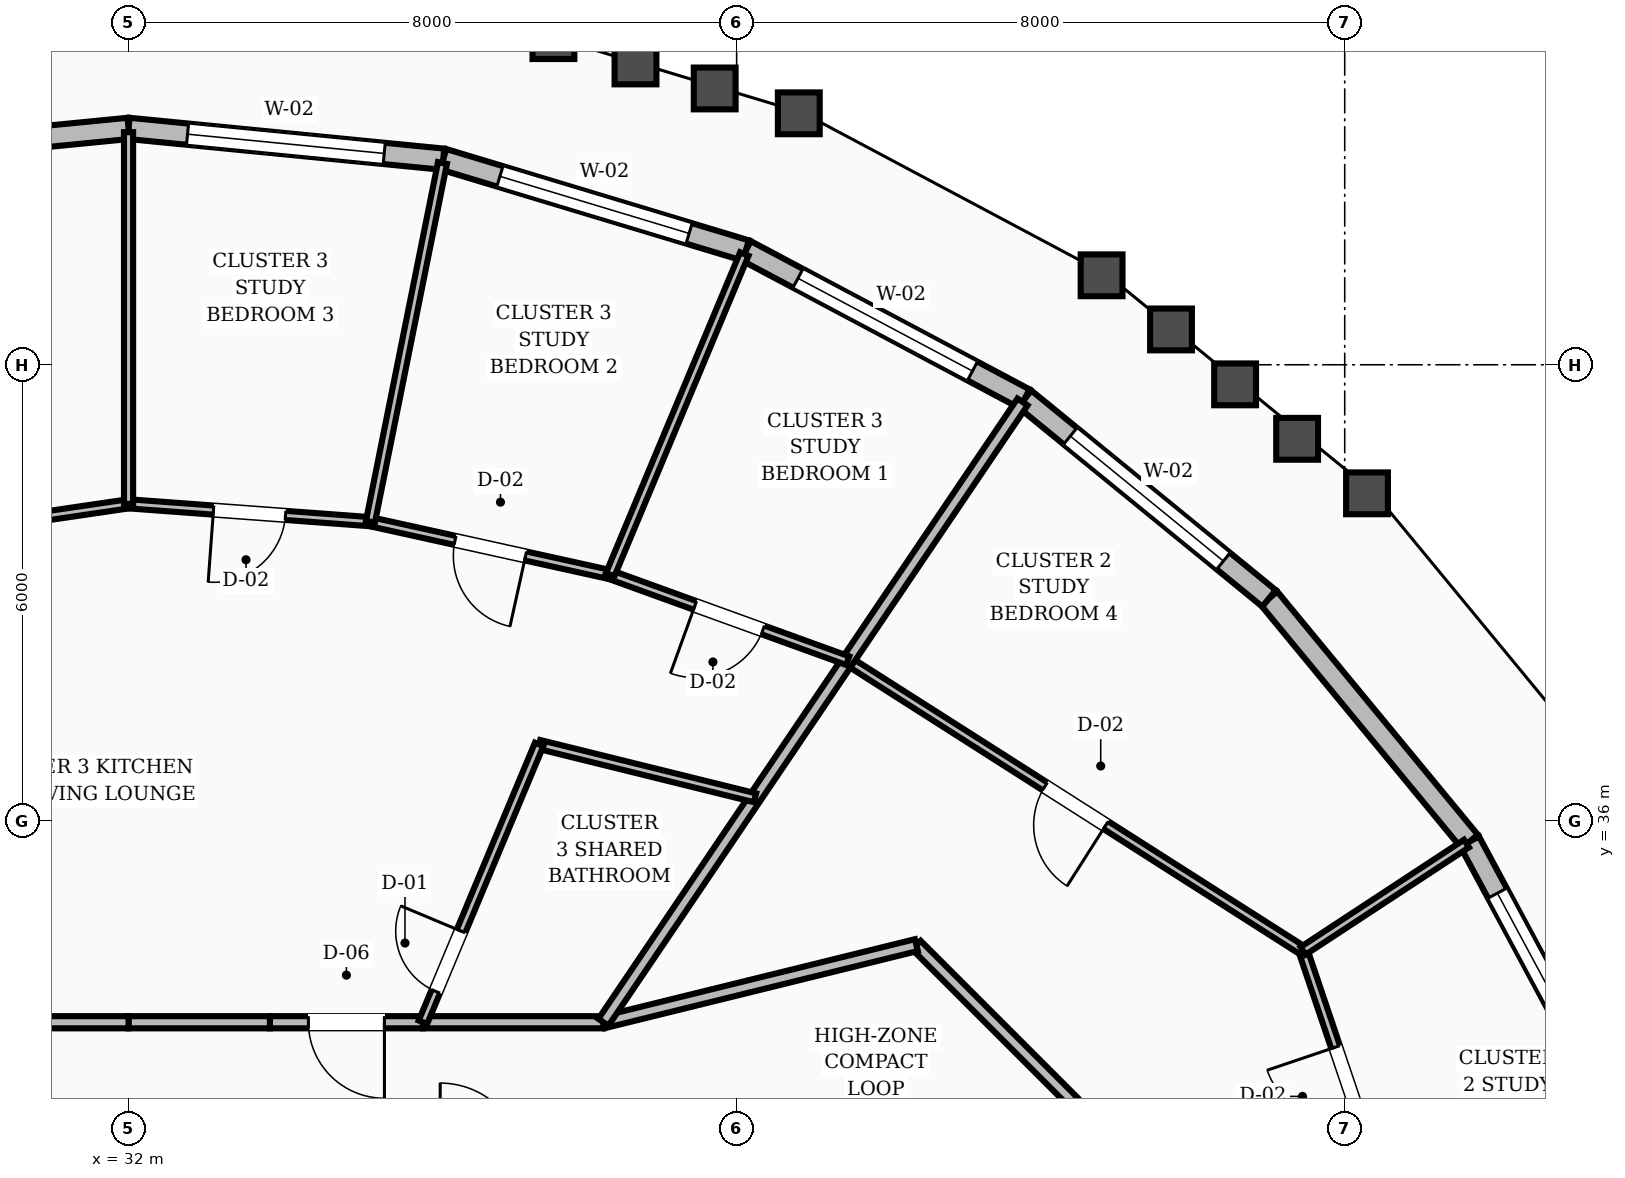
"""IFC4 building model, lengths in metres.
Left out: names, types, materials, properties, quantities, classifications, styles, units other than length and angle.
Written with IfcOpenShell. Run it as: python <this file> out.ifc"""

import sys

from ifc_helpers import new_model, si_unit, direction, frame, frame_2d, origin, place, context, subcontext, project, spatial, rectangle, extrude, element, fill, save


model = new_model("IFC4")
c1 = context("Model", 3, precision=1e-05, world=origin(), true_north=direction((0.0, 1.0)))
c2 = subcontext(c1, "Body", "Model", "MODEL_VIEW")
j1 = project(units=[si_unit("LENGTHUNIT", "METRE"), si_unit("PLANEANGLEUNIT", "RADIAN")], contexts=[c1])
p1 = place(None, origin())
s1 = spatial("IfcSite", under=j1, at=p1, CompositionType="ELEMENT")
p2 = place(p1, origin())
s2 = spatial("IfcBuilding", under=s1, at=p2, CompositionType="ELEMENT")
p3 = place(p2, frame((0.0, 0.0, 247.2)))
s3 = spatial("IfcBuildingStorey", under=s2, at=p3, CompositionType="ELEMENT", Elevation=247.2)
p4 = place(p3, frame((51.604, 32.078, 0.0), z_axis=(0.0, 0.0, 1.0), x_axis=(-0.473326520675, 0.880887055658, 0.0)))
e1 = element("IfcWall", 1, at=p4, inside=s3, PredefinedType="STANDARD", context=c2, shape_type="SweptSolid", body=[
    extrude(rectangle(XDim=4.143, YDim=0.28, at=frame_2d((2.071, 0.0))), origin(), (0.0, 0.0, 1.0), 2.88),
])
p5 = place(p4, frame((0.771, 0.0, 0.8)))
e2 = element("IfcOpeningElement", 2, at=p5, cuts=e1, PredefinedType="OPENING", context=c2, shape_type="SweptSolid", body=[
    extrude(rectangle(XDim=2.6, YDim=1.65, at=frame_2d((1.3, 0.825))), frame((0.0, 0.15, 0.0), z_axis=(0.0, -1.0, 0.0), x_axis=(1.0, 0.0, 0.0)), (0.0, 0.0, 1.0), 0.3),
])
p6 = place(p3, frame((49.644, 35.728, 0.0), z_axis=(0.0, 0.0, 1.0), x_axis=(-0.63634880002, 0.771401454959, 0.0)))
e3 = element("IfcWall", 3, at=p6, inside=s3, PredefinedType="STANDARD", context=c2, shape_type="SweptSolid", body=[
    extrude(rectangle(XDim=4.147, YDim=0.28, at=frame_2d((2.073, 0.0))), origin(), (0.0, 0.0, 1.0), 2.88),
])
p7 = place(p3, frame((47.005, 38.927, 0.0), z_axis=(0.0, 0.0, 1.0), x_axis=(-0.774627683951, 0.632417545025, 0.0)))
e4 = element("IfcWall", 4, at=p7, inside=s3, PredefinedType="STANDARD", context=c2, shape_type="SweptSolid", body=[
    extrude(rectangle(XDim=4.151, YDim=0.28, at=frame_2d((2.076, 0.0))), origin(), (0.0, 0.0, 1.0), 2.88),
])
p8 = place(p7, frame((0.776, 0.0, 0.8)))
e5 = element("IfcOpeningElement", 5, at=p8, cuts=e4, PredefinedType="OPENING", context=c2, shape_type="SweptSolid", body=[
    extrude(rectangle(XDim=2.6, YDim=1.65, at=frame_2d((1.3, 0.825))), frame((0.0, 0.15, 0.0), z_axis=(0.0, -1.0, 0.0), x_axis=(1.0, 0.0, 0.0)), (0.0, 0.0, 1.0), 0.3),
])
p9 = place(p3, frame((43.789, 41.552, 0.0), z_axis=(0.0, 0.0, 1.0), x_axis=(-0.88293458377, 0.469496028506, 0.0)))
e6 = element("IfcWall", 6, at=p9, inside=s3, PredefinedType="STANDARD", context=c2, shape_type="SweptSolid", body=[
    extrude(rectangle(XDim=4.155, YDim=0.28, at=frame_2d((2.077, 0.0))), origin(), (0.0, 0.0, 1.0), 2.88),
])
p10 = place(p9, frame((0.778, 0.0, 0.8)))
e7 = element("IfcOpeningElement", 7, at=p10, cuts=e6, PredefinedType="OPENING", context=c2, shape_type="SweptSolid", body=[
    extrude(rectangle(XDim=2.6, YDim=1.65, at=frame_2d((1.3, 0.825))), frame((0.0, 0.15, 0.0), z_axis=(0.0, -1.0, 0.0), x_axis=(1.0, 0.0, 0.0)), (0.0, 0.0, 1.0), 0.3),
])
p11 = place(p3, frame((40.121, 43.503, 0.0), z_axis=(0.0, 0.0, 1.0), x_axis=(-0.957348244256, 0.288936566083, 0.0)))
e8 = element("IfcWall", 8, at=p11, inside=s3, PredefinedType="STANDARD", context=c2, shape_type="SweptSolid", body=[
    extrude(rectangle(XDim=4.158, YDim=0.28, at=frame_2d((2.079, 0.0))), origin(), (0.0, 0.0, 1.0), 2.88),
])
p12 = place(p11, frame((0.779, 0.0, 0.8)))
e9 = element("IfcOpeningElement", 9, at=p12, cuts=e8, PredefinedType="OPENING", context=c2, shape_type="SweptSolid", body=[
    extrude(rectangle(XDim=2.6, YDim=1.65, at=frame_2d((1.3, 0.825))), frame((0.0, 0.15, 0.0), z_axis=(0.0, -1.0, 0.0), x_axis=(1.0, 0.0, 0.0)), (0.0, 0.0, 1.0), 0.3),
])
p13 = place(p3, frame((36.14, 44.704, 0.0), z_axis=(0.0, 0.0, 1.0), x_axis=(-0.995236791144, 0.09748707378, 0.0)))
e10 = element("IfcWall", 10, at=p13, inside=s3, PredefinedType="STANDARD", context=c2, shape_type="SweptSolid", body=[
    extrude(rectangle(XDim=4.16, YDim=0.28, at=frame_2d((2.08, 0.0))), origin(), (0.0, 0.0, 1.0), 2.88),
])
p14 = place(p13, frame((0.78, 0.0, 0.8)))
e11 = element("IfcOpeningElement", 11, at=p14, cuts=e10, PredefinedType="OPENING", context=c2, shape_type="SweptSolid", body=[
    extrude(rectangle(XDim=2.6, YDim=1.65, at=frame_2d((1.3, 0.825))), frame((0.0, 0.15, 0.0), z_axis=(0.0, -1.0, 0.0), x_axis=(1.0, 0.0, 0.0)), (0.0, 0.0, 1.0), 0.3),
])
p15 = place(p3, frame((32.0, 45.11, 0.0), z_axis=(0.0, 0.0, 1.0), x_axis=(-0.995236791144, -0.09748707378, 0.0)))
e12 = element("IfcWall", 12, at=p15, inside=s3, PredefinedType="STANDARD", context=c2, shape_type="SweptSolid", body=[
    extrude(rectangle(XDim=4.16, YDim=0.28, at=frame_2d((2.08, 0.0))), origin(), (0.0, 0.0, 1.0), 2.88),
])
p16 = place(p3, frame((44.427, 32.303, 0.0), z_axis=(0.0, 0.0, 1.0), x_axis=(-0.707106781187, 0.707106781187, 0.0)))
e13 = element("IfcWall", 13, at=p16, inside=s3, PredefinedType="SOLIDWALL", context=c2, shape_type="SweptSolid", body=[
    extrude(rectangle(XDim=2.916, YDim=0.16, at=frame_2d((1.458, 0.0))), origin(), (0.0, 0.0, 1.0), 2.87),
])
p17 = place(p3, frame((42.365, 34.365, 0.0), z_axis=(0.0, 0.0, 1.0), x_axis=(-0.970939799552, -0.239323850978, 0.0)))
e14 = element("IfcWall", 14, at=p17, inside=s3, PredefinedType="SOLIDWALL", context=c2, shape_type="SweptSolid", body=[
    extrude(rectangle(XDim=4.241, YDim=0.16, at=frame_2d((2.12, 0.0))), origin(), (0.0, 0.0, 1.0), 2.87),
])
p18 = place(p3, frame((38.248, 33.35, 0.0), z_axis=(0.0, 0.0, 1.0), x_axis=(-1.0, 0.0, 0.0)))
e15 = element("IfcWall", 15, at=p18, inside=s3, PredefinedType="SOLIDWALL", context=c2, shape_type="SweptSolid", body=[
    extrude(rectangle(XDim=2.375, YDim=0.16, at=frame_2d((1.188, 0.0))), origin(), (0.0, 0.0, 1.0), 2.87),
])
p19 = place(p3, frame((35.873, 33.35, 0.0), z_axis=(0.0, 0.0, 1.0), x_axis=(-1.0, 0.0, 0.0)))
e16 = element("IfcWall", 16, at=p19, inside=s3, PredefinedType="SOLIDWALL", context=c2, shape_type="SweptSolid", body=[
    extrude(rectangle(XDim=2.013, YDim=0.16, at=frame_2d((1.006, 0.0))), origin(), (0.0, 0.0, 1.0), 2.87),
])
p20 = place(p19, frame((0.507, 0.0, 0.0)))
e17 = element("IfcOpeningElement", 17, at=p20, cuts=e16, PredefinedType="OPENING", context=c2, shape_type="SweptSolid", body=[
    extrude(rectangle(XDim=1.0, YDim=2.1, at=frame_2d((0.5, 1.05))), frame((0.0, 0.09, 0.0), z_axis=(0.0, -1.0, 0.0), x_axis=(1.0, 0.0, 0.0)), (0.0, 0.0, 1.0), 0.18),
])
for number, where, z_axis, x_axis in (
    (18, (33.86, 33.35, 0.0), (0.0, 0.0, 1.0), (-1.0, 0.0, 0.0)),
    (19, (32.0, 33.35, 0.0), (0.0, 0.0, 1.0), (-1.0, 0.0, 0.0)),
):
    element("IfcWall", number, at=place(p3, frame(where, z_axis=z_axis, x_axis=x_axis)), inside=s3, PredefinedType="SOLIDWALL", context=c2, shape_type="SweptSolid", body=[
        extrude(rectangle(XDim=1.86, YDim=0.16, at=frame_2d((0.93, 0.0))), origin(), (0.0, 0.0, 1.0), 2.87),
    ])
p21 = place(p3, frame((48.612, 30.857, 0.0), z_axis=(0.0, 0.0, 1.0), x_axis=(-0.320106009533, 0.947381730171, 0.0)))
e20 = element("IfcWall", 20, at=p21, inside=s3, PredefinedType="PARTITIONING", context=c2, shape_type="SweptSolid", body=[
    extrude(rectangle(XDim=3.624, YDim=0.12, at=frame_2d((1.812, 0.0))), origin(), (0.0, 0.0, 1.0), 2.87),
])
p22 = place(p21, frame((1.337, 0.0, 0.0)))
e21 = element("IfcOpeningElement", 21, at=p22, cuts=e20, PredefinedType="OPENING", context=c2, shape_type="SweptSolid", body=[
    extrude(rectangle(XDim=0.95, YDim=2.1, at=frame_2d((0.475, 1.05))), frame((0.0, 0.07, 0.0), z_axis=(0.0, -1.0, 0.0), x_axis=(1.0, 0.0, 0.0)), (0.0, 0.0, 1.0), 0.14),
])
p23 = place(p3, frame((47.452, 34.29, 0.0), z_axis=(0.0, 0.0, 1.0), x_axis=(-0.84332026634, 0.53741132141, 0.0)))
e22 = element("IfcWall", 22, at=p23, inside=s3, PredefinedType="PARTITIONING", context=c2, shape_type="SweptSolid", body=[
    extrude(rectangle(XDim=7.104, YDim=0.12, at=frame_2d((3.552, 0.0))), origin(), (0.0, 0.0, 1.0), 2.87),
])
p24 = place(p23, frame((3.077, 0.0, 0.0)))
e23 = element("IfcOpeningElement", 23, at=p24, cuts=e22, PredefinedType="OPENING", context=c2, shape_type="SweptSolid", body=[
    extrude(rectangle(XDim=0.95, YDim=2.1, at=frame_2d((0.475, 1.05))), frame((0.0, 0.07, 0.0), z_axis=(0.0, -1.0, 0.0), x_axis=(1.0, 0.0, 0.0)), (0.0, 0.0, 1.0), 0.14),
])
p25 = place(p3, frame((47.452, 34.29, 0.0), z_axis=(0.0, 0.0, 1.0), x_axis=(0.835988015849, 0.548747699181, 0.0)))
e24 = element("IfcWall", 24, at=p25, inside=s3, PredefinedType="PARTITIONING", context=c2, shape_type="SweptSolid", body=[
    extrude(rectangle(XDim=2.571, YDim=0.12, at=frame_2d((1.286, 0.0))), origin(), (0.0, 0.0, 1.0), 2.87),
])
p26 = place(p3, frame((38.248, 33.35, 0.0), z_axis=(0.0, 0.0, 1.0), x_axis=(0.559821071882, 0.828613521177, 0.0)))
e25 = element("IfcWall", 25, at=p26, inside=s3, PredefinedType="SOLIDWALL", context=c2, shape_type="SweptSolid", body=[
    extrude(rectangle(XDim=9.849, YDim=0.16, at=frame_2d((4.924, 0.0))), origin(), (0.0, 0.0, 1.0), 2.87),
])
p27 = place(p3, frame((40.242, 36.303, 0.0), z_axis=(0.0, 0.0, 1.0), x_axis=(-0.970777237008, 0.239982407911, 0.0)))
e26 = element("IfcWall", 26, at=p27, inside=s3, PredefinedType="PARTITIONING", context=c2, shape_type="SweptSolid", body=[
    extrude(rectangle(XDim=2.926, YDim=0.12, at=frame_2d((1.463, 0.0))), origin(), (0.0, 0.0, 1.0), 2.87),
])
p28 = place(p3, frame((35.873, 33.35, 0.0), z_axis=(0.0, 0.0, 1.0), x_axis=(0.386006387389, 0.922496107794, 0.0)))
e27 = element("IfcWall", 27, at=p28, inside=s3, PredefinedType="PARTITIONING", context=c2, shape_type="SweptSolid", body=[
    extrude(rectangle(XDim=3.962, YDim=0.12, at=frame_2d((1.981, 0.0))), origin(), (0.0, 0.0, 1.0), 2.87),
])
p29 = place(p28, frame((0.44, 0.0, 0.0)))
e28 = element("IfcOpeningElement", 28, at=p29, cuts=e27, PredefinedType="OPENING", context=c2, shape_type="SweptSolid", body=[
    extrude(rectangle(XDim=0.86, YDim=2.1, at=frame_2d((0.43, 1.05))), frame((0.0, 0.07, 0.0), z_axis=(0.0, -1.0, 0.0), x_axis=(1.0, 0.0, 0.0)), (0.0, 0.0, 1.0), 0.14),
])
p30 = place(p3, frame((41.462, 38.107, 0.0), z_axis=(0.0, 0.0, 1.0), x_axis=(-0.940285712811, 0.340386219293, 0.0)))
e29 = element("IfcWall", 29, at=p30, inside=s3, PredefinedType="PARTITIONING", context=c2, shape_type="SweptSolid", body=[
    extrude(rectangle(XDim=3.324, YDim=0.12, at=frame_2d((1.662, 0.0))), origin(), (0.0, 0.0, 1.0), 2.87),
])
p31 = place(p30, frame((1.187, 0.0, 0.0)))
e30 = element("IfcOpeningElement", 30, at=p31, cuts=e29, PredefinedType="OPENING", context=c2, shape_type="SweptSolid", body=[
    extrude(rectangle(XDim=0.95, YDim=2.1, at=frame_2d((0.475, 1.05))), frame((0.0, 0.07, 0.0), z_axis=(0.0, -1.0, 0.0), x_axis=(1.0, 0.0, 0.0)), (0.0, 0.0, 1.0), 0.14),
])
p32 = place(p3, frame((38.336, 39.239, 0.0), z_axis=(0.0, 0.0, 1.0), x_axis=(-0.976460139278, 0.215697928599, 0.0)))
e31 = element("IfcWall", 31, at=p32, inside=s3, PredefinedType="PARTITIONING", context=c2, shape_type="SweptSolid", body=[
    extrude(rectangle(XDim=3.23, YDim=0.12, at=frame_2d((1.615, 0.0))), origin(), (0.0, 0.0, 1.0), 2.87),
])
p33 = place(p32, frame((1.14, 0.0, 0.0)))
e32 = element("IfcOpeningElement", 32, at=p33, cuts=e31, PredefinedType="OPENING", context=c2, shape_type="SweptSolid", body=[
    extrude(rectangle(XDim=0.95, YDim=2.1, at=frame_2d((0.475, 1.05))), frame((0.0, 0.07, 0.0), z_axis=(0.0, -1.0, 0.0), x_axis=(1.0, 0.0, 0.0)), (0.0, 0.0, 1.0), 0.14),
])
p34 = place(p3, frame((38.336, 39.239, 0.0), z_axis=(0.0, 0.0, 1.0), x_axis=(0.385972204877, 0.922510410273, 0.0)))
e33 = element("IfcWall", 33, at=p34, inside=s3, PredefinedType="PARTITIONING", context=c2, shape_type="SweptSolid", body=[
    extrude(rectangle(XDim=4.573, YDim=0.12, at=frame_2d((2.286, 0.0))), origin(), (0.0, 0.0, 1.0), 2.87),
])
p35 = place(p3, frame((35.182, 39.935, 0.0), z_axis=(0.0, 0.0, 1.0), x_axis=(-0.997276098801, 0.073758950379, 0.0)))
e34 = element("IfcWall", 34, at=p35, inside=s3, PredefinedType="PARTITIONING", context=c2, shape_type="SweptSolid", body=[
    extrude(rectangle(XDim=3.191, YDim=0.12, at=frame_2d((1.595, 0.0))), origin(), (0.0, 0.0, 1.0), 2.87),
])
p36 = place(p35, frame((1.12, 0.0, 0.0)))
e35 = element("IfcOpeningElement", 35, at=p36, cuts=e34, PredefinedType="OPENING", context=c2, shape_type="SweptSolid", body=[
    extrude(rectangle(XDim=0.95, YDim=2.1, at=frame_2d((0.475, 1.05))), frame((0.0, 0.07, 0.0), z_axis=(0.0, -1.0, 0.0), x_axis=(1.0, 0.0, 0.0)), (0.0, 0.0, 1.0), 0.14),
])
p37 = place(p3, frame((35.182, 39.935, 0.0), z_axis=(0.0, 0.0, 1.0), x_axis=(0.196876805664, 0.980428234697, 0.0)))
e36 = element("IfcWall", 36, at=p37, inside=s3, PredefinedType="PARTITIONING", context=c2, shape_type="SweptSolid", body=[
    extrude(rectangle(XDim=4.814, YDim=0.12, at=frame_2d((2.407, 0.0))), origin(), (0.0, 0.0, 1.0), 2.87),
])
p38 = place(p3, frame((32.0, 40.171, 0.0), z_axis=(0.0, 0.0, 1.0), x_axis=(-0.989352356065, -0.145540082278, 0.0)))
e37 = element("IfcWall", 37, at=p38, inside=s3, PredefinedType="PARTITIONING", context=c2, shape_type="SweptSolid", body=[
    extrude(rectangle(XDim=6.405, YDim=0.12, at=frame_2d((3.202, 0.0))), origin(), (0.0, 0.0, 1.0), 2.87),
])
p39 = place(p38, frame((2.727, 0.0, 0.0)))
e38 = element("IfcOpeningElement", 38, at=p39, cuts=e37, PredefinedType="OPENING", context=c2, shape_type="SweptSolid", body=[
    extrude(rectangle(XDim=0.95, YDim=2.1, at=frame_2d((0.475, 1.05))), frame((0.0, 0.07, 0.0), z_axis=(0.0, -1.0, 0.0), x_axis=(1.0, 0.0, 0.0)), (0.0, 0.0, 1.0), 0.14),
])
p40 = place(p3, frame((32.0, 40.171, 0.0), z_axis=(0.0, 0.0, 1.0), x_axis=(0.0, 1.0, 0.0)))
e39 = element("IfcWall", 39, at=p40, inside=s3, PredefinedType="PARTITIONING", context=c2, shape_type="SweptSolid", body=[
    extrude(rectangle(XDim=4.889, YDim=0.12, at=frame_2d((2.445, 0.0))), origin(), (0.0, 0.0, 1.0), 2.87),
])
p41 = place(p5, origin())
e40 = element("IfcWindow", 40, at=p41, inside=s3, PartitioningType="SINGLE_PANEL", PredefinedType="WINDOW", context=c2, shape_type="SweptSolid", body=[
    extrude(rectangle(XDim=2.6, YDim=1.65, at=frame_2d((1.3, 0.825))), frame((0.0, 0.03, 0.0), z_axis=(0.0, -1.0, 0.0), x_axis=(1.0, 0.0, 0.0)), (0.0, 0.0, 1.0), 0.06),
])
fill(e2, e40)
p42 = place(p8, origin())
e41 = element("IfcWindow", 41, at=p42, inside=s3, PartitioningType="SINGLE_PANEL", PredefinedType="WINDOW", context=c2, shape_type="SweptSolid", body=[
    extrude(rectangle(XDim=2.6, YDim=1.65, at=frame_2d((1.3, 0.825))), frame((0.0, 0.03, 0.0), z_axis=(0.0, -1.0, 0.0), x_axis=(1.0, 0.0, 0.0)), (0.0, 0.0, 1.0), 0.06),
])
fill(e5, e41)
p43 = place(p10, origin())
e42 = element("IfcWindow", 42, at=p43, inside=s3, PartitioningType="SINGLE_PANEL", PredefinedType="WINDOW", context=c2, shape_type="SweptSolid", body=[
    extrude(rectangle(XDim=2.6, YDim=1.65, at=frame_2d((1.3, 0.825))), frame((0.0, 0.03, 0.0), z_axis=(0.0, -1.0, 0.0), x_axis=(1.0, 0.0, 0.0)), (0.0, 0.0, 1.0), 0.06),
])
fill(e7, e42)
p44 = place(p12, origin())
e43 = element("IfcWindow", 43, at=p44, inside=s3, PartitioningType="SINGLE_PANEL", PredefinedType="WINDOW", context=c2, shape_type="SweptSolid", body=[
    extrude(rectangle(XDim=2.6, YDim=1.65, at=frame_2d((1.3, 0.825))), frame((0.0, 0.03, 0.0), z_axis=(0.0, -1.0, 0.0), x_axis=(1.0, 0.0, 0.0)), (0.0, 0.0, 1.0), 0.06),
])
fill(e9, e43)
p45 = place(p14, origin())
e44 = element("IfcWindow", 44, at=p45, inside=s3, PartitioningType="SINGLE_PANEL", PredefinedType="WINDOW", context=c2, shape_type="SweptSolid", body=[
    extrude(rectangle(XDim=2.6, YDim=1.65, at=frame_2d((1.3, 0.825))), frame((0.0, 0.03, 0.0), z_axis=(0.0, -1.0, 0.0), x_axis=(1.0, 0.0, 0.0)), (0.0, 0.0, 1.0), 0.06),
])
fill(e11, e44)
p46 = place(p22, origin())
e45 = element("IfcDoor", 45, at=p46, inside=s3, OperationType="SINGLE_SWING_RIGHT", PredefinedType="DOOR", context=c2, shape_type="SweptSolid", body=[
    extrude(rectangle(XDim=0.95, YDim=2.1, at=frame_2d((0.475, 1.05))), frame((0.0, 0.025, 0.0), z_axis=(0.0, -1.0, 0.0), x_axis=(1.0, 0.0, 0.0)), (0.0, 0.0, 1.0), 0.05),
])
fill(e21, e45)
p47 = place(p24, origin())
e46 = element("IfcDoor", 46, at=p47, inside=s3, OperationType="SINGLE_SWING_LEFT", PredefinedType="DOOR", context=c2, shape_type="SweptSolid", body=[
    extrude(rectangle(XDim=0.95, YDim=2.1, at=frame_2d((0.475, 1.05))), frame((0.0, 0.025, 0.0), z_axis=(0.0, -1.0, 0.0), x_axis=(1.0, 0.0, 0.0)), (0.0, 0.0, 1.0), 0.05),
])
fill(e23, e46)
p48 = place(p29, origin())
e47 = element("IfcDoor", 47, at=p48, inside=s3, OperationType="SINGLE_SWING_RIGHT", PredefinedType="DOOR", context=c2, shape_type="SweptSolid", body=[
    extrude(rectangle(XDim=0.86, YDim=2.1, at=frame_2d((0.43, 1.05))), frame((0.0, 0.025, 0.0), z_axis=(0.0, -1.0, 0.0), x_axis=(1.0, 0.0, 0.0)), (0.0, 0.0, 1.0), 0.05),
])
fill(e28, e47)
p49 = place(p20, origin())
e48 = element("IfcDoor", 48, at=p49, inside=s3, OperationType="SINGLE_SWING_LEFT", PredefinedType="DOOR", context=c2, shape_type="SweptSolid", body=[
    extrude(rectangle(XDim=1.0, YDim=2.1, at=frame_2d((0.5, 1.05))), frame((0.0, 0.025, 0.0), z_axis=(0.0, -1.0, 0.0), x_axis=(1.0, 0.0, 0.0)), (0.0, 0.0, 1.0), 0.05),
])
fill(e17, e48)
p50 = place(p31, origin())
e49 = element("IfcDoor", 49, at=p50, inside=s3, OperationType="SINGLE_SWING_RIGHT", PredefinedType="DOOR", context=c2, shape_type="SweptSolid", body=[
    extrude(rectangle(XDim=0.95, YDim=2.1, at=frame_2d((0.475, 1.05))), frame((0.0, 0.025, 0.0), z_axis=(0.0, -1.0, 0.0), x_axis=(1.0, 0.0, 0.0)), (0.0, 0.0, 1.0), 0.05),
])
fill(e30, e49)
p51 = place(p33, origin())
e50 = element("IfcDoor", 50, at=p51, inside=s3, OperationType="SINGLE_SWING_LEFT", PredefinedType="DOOR", context=c2, shape_type="SweptSolid", body=[
    extrude(rectangle(XDim=0.95, YDim=2.1, at=frame_2d((0.475, 1.05))), frame((0.0, 0.025, 0.0), z_axis=(0.0, -1.0, 0.0), x_axis=(1.0, 0.0, 0.0)), (0.0, 0.0, 1.0), 0.05),
])
fill(e32, e50)
p52 = place(p36, origin())
e51 = element("IfcDoor", 51, at=p52, inside=s3, OperationType="SINGLE_SWING_RIGHT", PredefinedType="DOOR", context=c2, shape_type="SweptSolid", body=[
    extrude(rectangle(XDim=0.95, YDim=2.1, at=frame_2d((0.475, 1.05))), frame((0.0, 0.025, 0.0), z_axis=(0.0, -1.0, 0.0), x_axis=(1.0, 0.0, 0.0)), (0.0, 0.0, 1.0), 0.05),
])
fill(e35, e51)
save(model, sys.argv[1])
